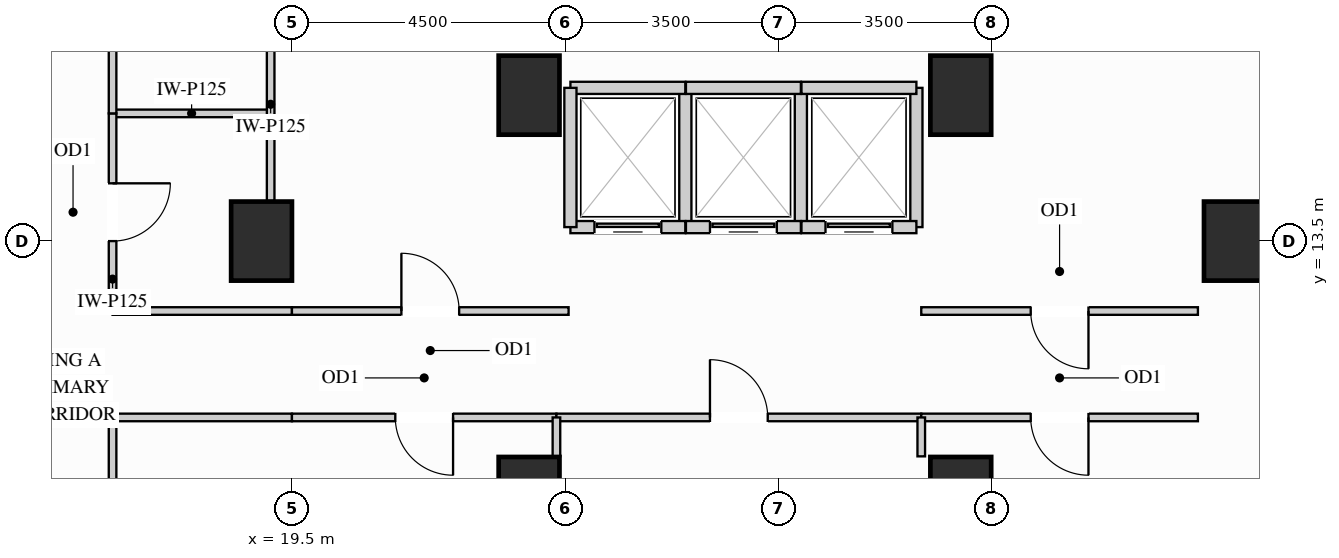
"""IFC4 building model, lengths in metres.
Left out: names, types, materials, properties, quantities, classifications, styles, units other than length and angle.
Written with IfcOpenShell. Run it as: python <this file> out.ifc"""

import sys

from ifc_helpers import new_model, si_unit, direction, frame, frame_2d, origin, origin_2d, place, context, subcontext, project, spatial, rectangle, extrude, source, transform, mapped, element, fill, save


model = new_model("IFC4")
c1 = context("Model", 3, precision=1e-05, world=origin(), true_north=direction((0.0, 1.0)))
c2 = subcontext(c1, "Body", "Model", "MODEL_VIEW")
j1 = project(units=[si_unit("LENGTHUNIT", "METRE"), si_unit("PLANEANGLEUNIT", "RADIAN")], contexts=[c1])
p1 = place(None, origin())
s1 = spatial("IfcSite", under=j1, at=p1, CompositionType="ELEMENT")
p2 = place(p1, origin())
s2 = spatial("IfcBuilding", under=s1, at=p2, CompositionType="ELEMENT")
p3 = place(p2, frame((0.0, 0.0, 51.3)))
s3 = spatial("IfcBuildingStorey", under=s2, at=p3, CompositionType="ELEMENT", Elevation=51.3)
m1 = source(origin(), c2, "Body", "SweptSolid", [
    extrude(rectangle(XDim=1.0, YDim=1.3, at=origin_2d()), origin(), (0.0, 0.0, 1.0), 3.38),
])
for number, where, z_axis, x_axis in (
    (1, (19.0, 13.5, 0.0), (0.0, 0.0, 1.0), (1.0, 0.0, 0.0)),
    (2, (35.0, 13.5, 0.0), (0.0, 0.0, 1.0), (1.0, 0.0, 0.0)),
    (3, (23.4, 15.9, 0.0), (0.0, 0.0, 1.0), (1.0, 0.0, 0.0)),
    (4, (23.4, 9.3, 0.0), (0.0, 0.0, 1.0), (1.0, 0.0, 0.0)),
    (5, (30.5, 15.9, 0.0), (0.0, 0.0, 1.0), (1.0, 0.0, 0.0)),
    (6, (30.5, 9.3, 0.0), (0.0, 0.0, 1.0), (1.0, 0.0, 0.0)),
):
    element("IfcColumn", number, at=place(p3, frame(where, z_axis=z_axis, x_axis=x_axis)), inside=s3, PredefinedType="COLUMN", context=c2, shape_type="MappedRepresentation", body=[
        mapped(m1, transform((0.0, 0.0, 0.0), x_axis=(1.0, 0.0, 0.0), y_axis=(0.0, 1.0, 0.0), z_axis=(0.0, 0.0, 1.0))),
    ])
m2 = source(origin(), c2, "Body", "SweptSolid", [
    extrude(rectangle(XDim=2.6, YDim=0.125, at=frame_2d((1.3, 0.0))), origin(), (0.0, 0.0, 1.0), 3.365),
])
p4 = place(p3, frame((16.55, 15.6, 0.0), z_axis=(0.0, 0.0, 1.0), x_axis=(1.0, 0.0, 0.0)))
e7 = element("IfcWall", 7, at=p4, inside=s3, PredefinedType="PARTITIONING", context=c2, shape_type="MappedRepresentation", body=[
    mapped(m2, transform((0.0, 0.0, 0.0), x_axis=(1.0, 0.0, 0.0), y_axis=(0.0, 1.0, 0.0), z_axis=(0.0, 0.0, 1.0))),
])
m3 = source(origin(), c2, "Body", "SweptSolid", [
    extrude(rectangle(XDim=3.18, YDim=0.125, at=frame_2d((1.59, 0.0))), origin(), (0.0, 0.0, 1.0), 2.67),
])
p5 = place(p3, frame((19.15, 14.16, 0.0), z_axis=(0.0, 0.0, 1.0), x_axis=(0.0, 1.0, 0.0)))
e8 = element("IfcWall", 8, at=p5, inside=s3, PredefinedType="PARTITIONING", context=c2, shape_type="MappedRepresentation", body=[
    mapped(m3, transform((0.0, 0.0, 0.0), x_axis=(1.0, 0.0, 0.0), y_axis=(0.0, 1.0, 0.0), z_axis=(0.0, 0.0, 1.0))),
])
p6 = place(p3, frame((16.55, 12.35, 0.0), z_axis=(0.0, 0.0, 1.0), x_axis=(0.0, 1.0, 0.0)))
e9 = element("IfcWall", 9, at=p6, inside=s3, PredefinedType="PARTITIONING", context=c2, shape_type="SweptSolid", body=[
    extrude(rectangle(XDim=3.25, YDim=0.125, at=frame_2d((1.625, 0.0))), origin(), (0.0, 0.0, 1.0), 3.365),
])
p7 = place(p6, frame((1.15, 0.0, 0.0)))
e10 = element("IfcOpeningElement", 10, at=p7, cuts=e9, PredefinedType="OPENING", context=c2, shape_type="SweptSolid", body=[
    extrude(rectangle(XDim=0.95, YDim=2.15, at=frame_2d((0.475, 1.075))), frame((0.0, 0.073, 0.0), z_axis=(0.0, -1.0, 0.0), x_axis=(1.0, 0.0, 0.0)), (0.0, 0.0, 1.0), 0.145),
])
p8 = place(p3, frame((16.55, 15.6, 0.0), z_axis=(0.0, 0.0, 1.0), x_axis=(0.0, 1.0, 0.0)))
e11 = element("IfcWall", 11, at=p8, inside=s3, PredefinedType="PARTITIONING", context=c2, shape_type="SweptSolid", body=[
    extrude(rectangle(XDim=7.75, YDim=0.125, at=frame_2d((3.875, 0.0))), origin(), (0.0, 0.0, 1.0), 3.365),
])
p9 = place(p8, frame((3.4, 0.0, 0.0)))
e12 = element("IfcOpeningElement", 12, at=p9, cuts=e11, PredefinedType="OPENING", context=c2, shape_type="SweptSolid", body=[
    extrude(rectangle(XDim=0.95, YDim=2.15, at=frame_2d((0.475, 1.075))), frame((0.0, 0.073, 0.0), z_axis=(0.0, -1.0, 0.0), x_axis=(1.0, 0.0, 0.0)), (0.0, 0.0, 1.0), 0.145),
])
p10 = place(p3, frame((16.55, 6.2, 0.0), z_axis=(0.0, 0.0, 1.0), x_axis=(0.0, 1.0, 0.0)))
e13 = element("IfcWall", 13, at=p10, inside=s3, PredefinedType="PARTITIONING", context=c2, shape_type="SweptSolid", body=[
    extrude(rectangle(XDim=4.4, YDim=0.125, at=frame_2d((2.2, 0.0))), origin(), (0.0, 0.0, 1.0), 3.365),
])
p11 = place(p10, frame((1.725, 0.0, 0.0)))
e14 = element("IfcOpeningElement", 14, at=p11, cuts=e13, PredefinedType="OPENING", context=c2, shape_type="SweptSolid", body=[
    extrude(rectangle(XDim=0.95, YDim=2.15, at=frame_2d((0.475, 1.075))), frame((0.0, 0.073, 0.0), z_axis=(0.0, -1.0, 0.0), x_axis=(1.0, 0.0, 0.0)), (0.0, 0.0, 1.0), 0.145),
])
p12 = place(p3, frame((29.85, 12.35, 0.0), z_axis=(0.0, 0.0, 1.0), x_axis=(1.0, 0.0, 0.0)))
e15 = element("IfcWall", 15, at=p12, inside=s3, PredefinedType="PARTITIONING", context=c2, shape_type="SweptSolid", body=[
    extrude(rectangle(XDim=4.55, YDim=0.125, at=frame_2d((2.275, 0.0))), origin(), (0.0, 0.0, 1.0), 3.365),
])
p13 = place(p12, frame((1.8, 0.0, 0.0)))
e16 = element("IfcOpeningElement", 16, at=p13, cuts=e15, PredefinedType="OPENING", context=c2, shape_type="SweptSolid", body=[
    extrude(rectangle(XDim=0.95, YDim=2.15, at=frame_2d((0.475, 1.075))), frame((0.0, 0.073, 0.0), z_axis=(0.0, -1.0, 0.0), x_axis=(1.0, 0.0, 0.0)), (0.0, 0.0, 1.0), 0.145),
])
m4 = source(origin(), c2, "Body", "SweptSolid", [
    extrude(rectangle(XDim=2.95, YDim=0.125, at=frame_2d((1.475, 0.0))), origin(), (0.0, 0.0, 1.0), 3.365),
])
p14 = place(p3, frame((16.55, 12.35, 0.0), z_axis=(0.0, 0.0, 1.0), x_axis=(1.0, 0.0, 0.0)))
e17 = element("IfcWall", 17, at=p14, inside=s3, PredefinedType="PARTITIONING", context=c2, shape_type="MappedRepresentation", body=[
    mapped(m4, transform((0.0, 0.0, 0.0), x_axis=(1.0, 0.0, 0.0), y_axis=(0.0, 1.0, 0.0), z_axis=(0.0, 0.0, 1.0))),
])
p15 = place(p3, frame((19.5, 12.35, 0.0), z_axis=(0.0, 0.0, 1.0), x_axis=(1.0, 0.0, 0.0)))
e18 = element("IfcWall", 18, at=p15, inside=s3, PredefinedType="PARTITIONING", context=c2, shape_type="SweptSolid", body=[
    extrude(rectangle(XDim=4.55, YDim=0.125, at=frame_2d((2.275, 0.0))), origin(), (0.0, 0.0, 1.0), 3.365),
])
p16 = place(p15, frame((1.8, 0.0, 0.0)))
e19 = element("IfcOpeningElement", 19, at=p16, cuts=e18, PredefinedType="OPENING", context=c2, shape_type="SweptSolid", body=[
    extrude(rectangle(XDim=0.95, YDim=2.15, at=frame_2d((0.475, 1.075))), frame((0.0, 0.073, 0.0), z_axis=(0.0, -1.0, 0.0), x_axis=(1.0, 0.0, 0.0)), (0.0, 0.0, 1.0), 0.145),
])
p17 = place(p3, frame((16.55, 10.6, 0.0), z_axis=(0.0, 0.0, 1.0), x_axis=(1.0, 0.0, 0.0)))
e20 = element("IfcWall", 20, at=p17, inside=s3, PredefinedType="PARTITIONING", context=c2, shape_type="MappedRepresentation", body=[
    mapped(m4, transform((0.0, 0.0, 0.0), x_axis=(1.0, 0.0, 0.0), y_axis=(0.0, 1.0, 0.0), z_axis=(0.0, 0.0, 1.0))),
])
p18 = place(p3, frame((19.5, 10.6, 0.0), z_axis=(0.0, 0.0, 1.0), x_axis=(1.0, 0.0, 0.0)))
e21 = element("IfcWall", 21, at=p18, inside=s3, PredefinedType="PARTITIONING", context=c2, shape_type="SweptSolid", body=[
    extrude(rectangle(XDim=4.35, YDim=0.125, at=frame_2d((2.175, 0.0))), origin(), (0.0, 0.0, 1.0), 3.365),
])
p19 = place(p18, frame((1.7, 0.0, 0.0)))
e22 = element("IfcOpeningElement", 22, at=p19, cuts=e21, PredefinedType="OPENING", context=c2, shape_type="SweptSolid", body=[
    extrude(rectangle(XDim=0.95, YDim=2.15, at=frame_2d((0.475, 1.075))), frame((0.0, 0.073, 0.0), z_axis=(0.0, -1.0, 0.0), x_axis=(1.0, 0.0, 0.0)), (0.0, 0.0, 1.0), 0.145),
])
p20 = place(p3, frame((23.85, 10.6, 0.0), z_axis=(0.0, 0.0, 1.0), x_axis=(1.0, 0.0, 0.0)))
e23 = element("IfcWall", 23, at=p20, inside=s3, PredefinedType="PARTITIONING", context=c2, shape_type="SweptSolid", body=[
    extrude(rectangle(XDim=6.0, YDim=0.125, at=frame_2d((3.0, 0.0))), origin(), (0.0, 0.0, 1.0), 3.365),
])
p21 = place(p20, frame((2.525, 0.0, 0.0)))
e24 = element("IfcOpeningElement", 24, at=p21, cuts=e23, PredefinedType="OPENING", context=c2, shape_type="SweptSolid", body=[
    extrude(rectangle(XDim=0.95, YDim=2.15, at=frame_2d((0.475, 1.075))), frame((0.0, 0.073, 0.0), z_axis=(0.0, -1.0, 0.0), x_axis=(1.0, 0.0, 0.0)), (0.0, 0.0, 1.0), 0.145),
])
p22 = place(p3, frame((29.85, 10.6, 0.0), z_axis=(0.0, 0.0, 1.0), x_axis=(1.0, 0.0, 0.0)))
e25 = element("IfcWall", 25, at=p22, inside=s3, PredefinedType="PARTITIONING", context=c2, shape_type="SweptSolid", body=[
    extrude(rectangle(XDim=4.55, YDim=0.125, at=frame_2d((2.275, 0.0))), origin(), (0.0, 0.0, 1.0), 3.365),
])
p23 = place(p22, frame((1.8, 0.0, 0.0)))
e26 = element("IfcOpeningElement", 26, at=p23, cuts=e25, PredefinedType="OPENING", context=c2, shape_type="SweptSolid", body=[
    extrude(rectangle(XDim=0.95, YDim=2.15, at=frame_2d((0.475, 1.075))), frame((0.0, 0.073, 0.0), z_axis=(0.0, -1.0, 0.0), x_axis=(1.0, 0.0, 0.0)), (0.0, 0.0, 1.0), 0.145),
])
m5 = source(origin(), c2, "Body", "SweptSolid", [
    extrude(rectangle(XDim=0.64, YDim=0.125, at=frame_2d((0.32, 0.0))), origin(), (0.0, 0.0, 1.0), 3.365),
])
for number, where, z_axis, x_axis in (
    (27, (23.85, 9.96, 0.0), (0.0, 0.0, 1.0), (0.0, 1.0, 0.0)),
    (28, (29.85, 9.96, 0.0), (0.0, 0.0, 1.0), (0.0, 1.0, 0.0)),
):
    element("IfcWall", number, at=place(p3, frame(where, z_axis=z_axis, x_axis=x_axis)), inside=s3, PredefinedType="PARTITIONING", context=c2, shape_type="MappedRepresentation", body=[
        mapped(m5, transform((0.0, 0.0, 0.0), x_axis=(1.0, 0.0, 0.0), y_axis=(0.0, 1.0, 0.0), z_axis=(0.0, 0.0, 1.0))),
    ])
m6 = source(origin(), c2, "Body", "SweptSolid", [
    extrude(rectangle(XDim=2.29, YDim=0.2, at=frame_2d((1.145, 0.0))), origin(), (0.0, 0.0, 1.0), 3.365),
])
p24 = place(p3, frame((25.97, 13.73, 0.0), z_axis=(0.0, 0.0, 1.0), x_axis=(0.0, 1.0, 0.0)))
e29 = element("IfcWall", 29, at=p24, inside=s3, PredefinedType="PARTITIONING", context=c2, shape_type="MappedRepresentation", body=[
    mapped(m6, transform((0.0, 0.0, 0.0), x_axis=(1.0, 0.0, 0.0), y_axis=(0.0, 1.0, 0.0), z_axis=(0.0, 0.0, 1.0))),
])
m7 = source(origin(), c2, "Body", "SweptSolid", [
    extrude(rectangle(XDim=1.89, YDim=0.2, at=frame_2d((0.945, 0.0))), origin(), (0.0, 0.0, 1.0), 2.67),
])
p25 = place(p3, frame((24.08, 16.02, 0.0), z_axis=(0.0, 0.0, 1.0), x_axis=(1.0, 0.0, 0.0)))
e30 = element("IfcWall", 30, at=p25, inside=s3, PredefinedType="PARTITIONING", context=c2, shape_type="MappedRepresentation", body=[
    mapped(m7, transform((0.0, 0.0, 0.0), x_axis=(1.0, 0.0, 0.0), y_axis=(0.0, 1.0, 0.0), z_axis=(0.0, 0.0, 1.0))),
])
p26 = place(p3, frame((24.08, 13.73, 0.0), z_axis=(0.0, 0.0, 1.0), x_axis=(1.0, 0.0, 0.0)))
e31 = element("IfcWall", 31, at=p26, inside=s3, PredefinedType="PARTITIONING", context=c2, shape_type="SweptSolid", body=[
    extrude(rectangle(XDim=1.89, YDim=0.2, at=frame_2d((0.945, 0.0))), origin(), (0.0, 0.0, 1.0), 2.446),
])
p27 = place(p26, frame((0.395, 0.0, 0.0)))
e32 = element("IfcOpeningElement", 32, at=p27, cuts=e31, PredefinedType="OPENING", context=c2, shape_type="SweptSolid", body=[
    extrude(rectangle(XDim=1.1, YDim=2.2, at=frame_2d((0.55, 1.1))), frame((0.0, 0.11, 0.0), z_axis=(0.0, -1.0, 0.0), x_axis=(1.0, 0.0, 0.0)), (0.0, 0.0, 1.0), 0.22),
])
for number, where, z_axis, x_axis in (
    (33, (24.08, 13.73, 0.0), (0.0, 0.0, 1.0), (0.0, 1.0, 0.0)),
    (34, (27.87, 13.73, 0.0), (0.0, 0.0, 1.0), (0.0, 1.0, 0.0)),
):
    element("IfcWall", number, at=place(p3, frame(where, z_axis=z_axis, x_axis=x_axis)), inside=s3, PredefinedType="PARTITIONING", context=c2, shape_type="MappedRepresentation", body=[
        mapped(m6, transform((0.0, 0.0, 0.0), x_axis=(1.0, 0.0, 0.0), y_axis=(0.0, 1.0, 0.0), z_axis=(0.0, 0.0, 1.0))),
    ])
m8 = source(origin(), c2, "Body", "SweptSolid", [
    extrude(rectangle(XDim=1.89, YDim=0.2, at=frame_2d((0.945, 0.0))), origin(), (0.0, 0.0, 1.0), 2.67),
])
p28 = place(p3, frame((25.98, 16.02, 0.0), z_axis=(0.0, 0.0, 1.0), x_axis=(1.0, 0.0, 0.0)))
e35 = element("IfcWall", 35, at=p28, inside=s3, PredefinedType="PARTITIONING", context=c2, shape_type="MappedRepresentation", body=[
    mapped(m8, transform((0.0, 0.0, 0.0), x_axis=(1.0, 0.0, 0.0), y_axis=(0.0, 1.0, 0.0), z_axis=(0.0, 0.0, 1.0))),
])
p29 = place(p3, frame((25.98, 13.73, 0.0), z_axis=(0.0, 0.0, 1.0), x_axis=(1.0, 0.0, 0.0)))
e36 = element("IfcWall", 36, at=p29, inside=s3, PredefinedType="PARTITIONING", context=c2, shape_type="SweptSolid", body=[
    extrude(rectangle(XDim=1.89, YDim=0.2, at=frame_2d((0.945, 0.0))), origin(), (0.0, 0.0, 1.0), 2.446),
])
p30 = place(p29, frame((0.395, 0.0, 0.0)))
e37 = element("IfcOpeningElement", 37, at=p30, cuts=e36, PredefinedType="OPENING", context=c2, shape_type="SweptSolid", body=[
    extrude(rectangle(XDim=1.1, YDim=2.2, at=frame_2d((0.55, 1.1))), frame((0.0, 0.11, 0.0), z_axis=(0.0, -1.0, 0.0), x_axis=(1.0, 0.0, 0.0)), (0.0, 0.0, 1.0), 0.22),
])
p31 = place(p3, frame((29.77, 13.73, 0.0), z_axis=(0.0, 0.0, 1.0), x_axis=(0.0, 1.0, 0.0)))
e38 = element("IfcWall", 38, at=p31, inside=s3, PredefinedType="PARTITIONING", context=c2, shape_type="MappedRepresentation", body=[
    mapped(m6, transform((0.0, 0.0, 0.0), x_axis=(1.0, 0.0, 0.0), y_axis=(0.0, 1.0, 0.0), z_axis=(0.0, 0.0, 1.0))),
])
p32 = place(p3, frame((27.88, 16.02, 0.0), z_axis=(0.0, 0.0, 1.0), x_axis=(1.0, 0.0, 0.0)))
e39 = element("IfcWall", 39, at=p32, inside=s3, PredefinedType="PARTITIONING", context=c2, shape_type="MappedRepresentation", body=[
    mapped(m8, transform((0.0, 0.0, 0.0), x_axis=(1.0, 0.0, 0.0), y_axis=(0.0, 1.0, 0.0), z_axis=(0.0, 0.0, 1.0))),
])
p33 = place(p3, frame((27.88, 13.73, 0.0), z_axis=(0.0, 0.0, 1.0), x_axis=(1.0, 0.0, 0.0)))
e40 = element("IfcWall", 40, at=p33, inside=s3, PredefinedType="PARTITIONING", context=c2, shape_type="SweptSolid", body=[
    extrude(rectangle(XDim=1.89, YDim=0.2, at=frame_2d((0.945, 0.0))), origin(), (0.0, 0.0, 1.0), 2.446),
])
p34 = place(p33, frame((0.395, 0.0, 0.0)))
e41 = element("IfcOpeningElement", 41, at=p34, cuts=e40, PredefinedType="OPENING", context=c2, shape_type="SweptSolid", body=[
    extrude(rectangle(XDim=1.1, YDim=2.2, at=frame_2d((0.55, 1.1))), frame((0.0, 0.11, 0.0), z_axis=(0.0, -1.0, 0.0), x_axis=(1.0, 0.0, 0.0)), (0.0, 0.0, 1.0), 0.22),
])
m9 = source(origin(), c2, "Body", "SweptSolid", [
    extrude(rectangle(XDim=1.1, YDim=2.2, at=frame_2d((0.55, 1.1))), frame((0.0, 0.025, 0.0), z_axis=(0.0, -1.0, 0.0), x_axis=(1.0, 0.0, 0.0)), (0.0, 0.0, 1.0), 0.05),
])
p35 = place(p27, origin())
e42 = element("IfcDoor", 42, at=p35, inside=s3, OperationType="SLIDING_TO_LEFT", PredefinedType="DOOR", context=c2, shape_type="MappedRepresentation", body=[
    mapped(m9, transform((0.0, 0.0, 0.0), x_axis=(1.0, 0.0, 0.0), y_axis=(0.0, 1.0, 0.0), z_axis=(0.0, 0.0, 1.0))),
])
fill(e32, e42)
p36 = place(p30, origin())
e43 = element("IfcDoor", 43, at=p36, inside=s3, OperationType="SLIDING_TO_LEFT", PredefinedType="DOOR", context=c2, shape_type="MappedRepresentation", body=[
    mapped(m9, transform((0.0, 0.0, 0.0), x_axis=(1.0, 0.0, 0.0), y_axis=(0.0, 1.0, 0.0), z_axis=(0.0, 0.0, 1.0))),
])
fill(e37, e43)
p37 = place(p34, origin())
e44 = element("IfcDoor", 44, at=p37, inside=s3, OperationType="SLIDING_TO_LEFT", PredefinedType="DOOR", context=c2, shape_type="MappedRepresentation", body=[
    mapped(m9, transform((0.0, 0.0, 0.0), x_axis=(1.0, 0.0, 0.0), y_axis=(0.0, 1.0, 0.0), z_axis=(0.0, 0.0, 1.0))),
])
fill(e41, e44)
m10 = source(origin(), c2, "Body", "SweptSolid", [
    extrude(rectangle(XDim=0.95, YDim=2.15, at=frame_2d((0.475, 1.075))), frame((0.0, 0.025, 0.0), z_axis=(0.0, -1.0, 0.0), x_axis=(1.0, 0.0, 0.0)), (0.0, 0.0, 1.0), 0.05),
])
p38 = place(p7, origin())
e45 = element("IfcDoor", 45, at=p38, inside=s3, OperationType="SINGLE_SWING_RIGHT", PredefinedType="DOOR", context=c2, shape_type="MappedRepresentation", body=[
    mapped(m10, transform((0.0, 0.0, 0.0), x_axis=(1.0, 0.0, 0.0), y_axis=(0.0, 1.0, 0.0), z_axis=(0.0, 0.0, 1.0))),
])
fill(e10, e45)
p39 = place(p16, origin())
e46 = element("IfcDoor", 46, at=p39, inside=s3, OperationType="SINGLE_SWING_LEFT", PredefinedType="DOOR", context=c2, shape_type="MappedRepresentation", body=[
    mapped(m10, transform((0.0, 0.0, 0.0), x_axis=(1.0, 0.0, 0.0), y_axis=(0.0, 1.0, 0.0), z_axis=(0.0, 0.0, 1.0))),
])
fill(e19, e46)
p40 = place(p13, origin())
e47 = element("IfcDoor", 47, at=p40, inside=s3, OperationType="SINGLE_SWING_RIGHT", PredefinedType="DOOR", context=c2, shape_type="MappedRepresentation", body=[
    mapped(m10, transform((0.0, 0.0, 0.0), x_axis=(1.0, 0.0, 0.0), y_axis=(0.0, 1.0, 0.0), z_axis=(0.0, 0.0, 1.0))),
])
fill(e16, e47)
p41 = place(p19, origin())
e48 = element("IfcDoor", 48, at=p41, inside=s3, OperationType="SINGLE_SWING_RIGHT", PredefinedType="DOOR", context=c2, shape_type="MappedRepresentation", body=[
    mapped(m10, transform((0.0, 0.0, 0.0), x_axis=(1.0, 0.0, 0.0), y_axis=(0.0, 1.0, 0.0), z_axis=(0.0, 0.0, 1.0))),
])
fill(e22, e48)
p42 = place(p21, origin())
e49 = element("IfcDoor", 49, at=p42, inside=s3, OperationType="SINGLE_SWING_LEFT", PredefinedType="DOOR", context=c2, shape_type="MappedRepresentation", body=[
    mapped(m10, transform((0.0, 0.0, 0.0), x_axis=(1.0, 0.0, 0.0), y_axis=(0.0, 1.0, 0.0), z_axis=(0.0, 0.0, 1.0))),
])
fill(e24, e49)
p43 = place(p23, origin())
e50 = element("IfcDoor", 50, at=p43, inside=s3, OperationType="SINGLE_SWING_RIGHT", PredefinedType="DOOR", context=c2, shape_type="MappedRepresentation", body=[
    mapped(m10, transform((0.0, 0.0, 0.0), x_axis=(1.0, 0.0, 0.0), y_axis=(0.0, 1.0, 0.0), z_axis=(0.0, 0.0, 1.0))),
])
fill(e26, e50)
save(model, sys.argv[1])
